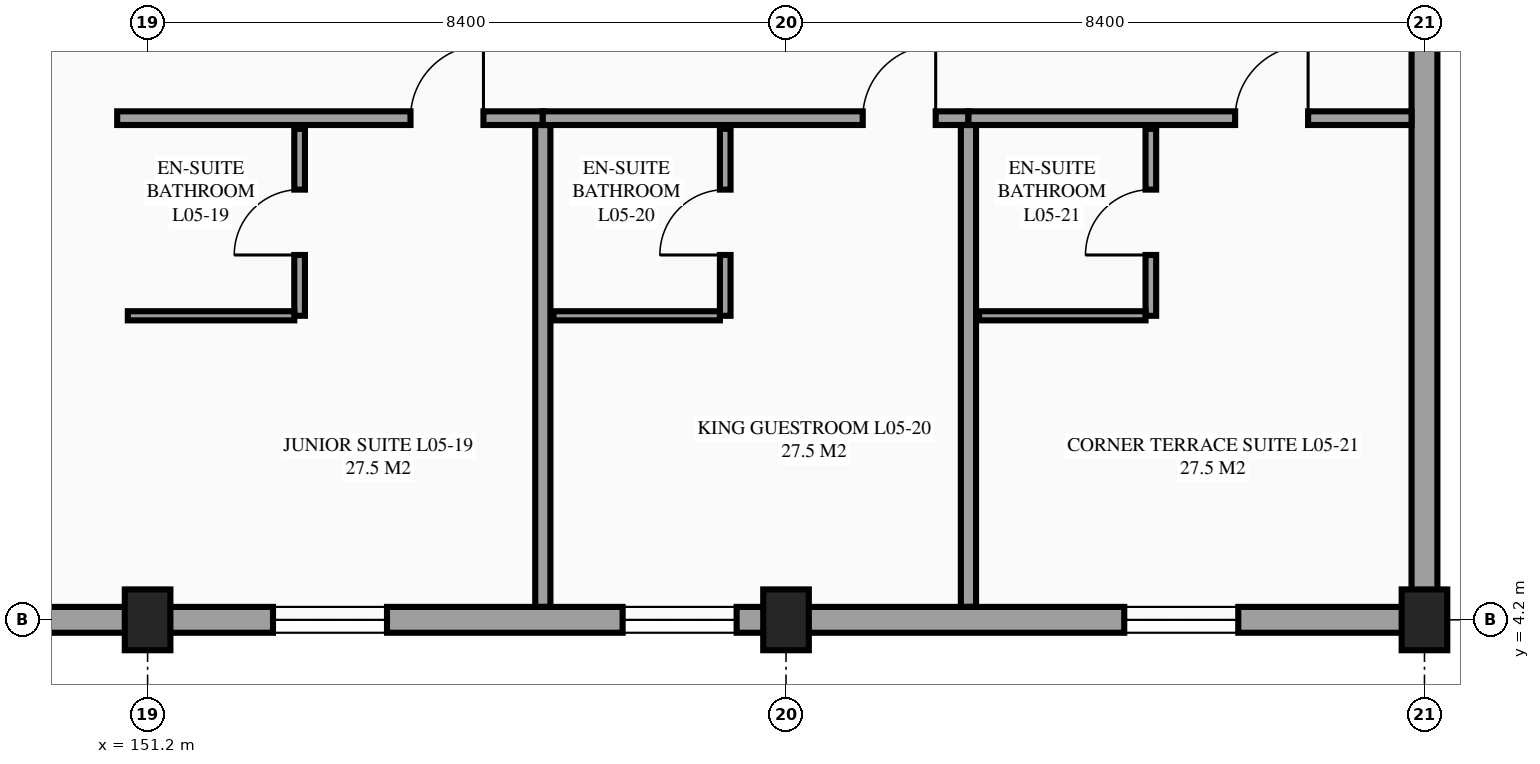
"""IFC4 building model, lengths in metres.
Left out: names, types, materials, properties, quantities, classifications, styles, units other than length and angle.
Written with IfcOpenShell. Run it as: python <this file> out.ifc"""

import sys

from ifc_helpers import new_model, si_unit, direction, frame, frame_2d, origin, origin_2d, place, context, subcontext, project, spatial, rectangle, extrude, element, fill, save


model = new_model("IFC4")
c1 = context("Model", 3, precision=1e-05, world=origin(), true_north=direction((0.0, 1.0)))
c2 = subcontext(c1, "Body", "Model", "MODEL_VIEW")
j1 = project(units=[si_unit("LENGTHUNIT", "METRE"), si_unit("PLANEANGLEUNIT", "RADIAN")], contexts=[c1])
p1 = place(None, origin())
s1 = spatial("IfcSite", under=j1, at=p1, CompositionType="ELEMENT")
p2 = place(p1, origin())
s2 = spatial("IfcBuilding", under=s1, at=p2, CompositionType="ELEMENT")
p3 = place(p2, frame((0.0, 0.0, 21.9)))
s3 = spatial("IfcBuildingStorey", under=s2, at=p3, CompositionType="ELEMENT", Elevation=21.9)
for number, where, z_axis, x_axis in (
    (1, (151.2, 4.2, 0.0), (0.0, 0.0, 1.0), (1.0, 0.0, 0.0)),
    (2, (159.6, 4.2, 0.0), (0.0, 0.0, 1.0), (1.0, 0.0, 0.0)),
    (3, (168.0, 4.2, 0.0), (0.0, 0.0, 1.0), (1.0, 0.0, 0.0)),
):
    element("IfcColumn", number, at=place(p3, frame(where, z_axis=z_axis, x_axis=x_axis)), inside=s3, PredefinedType="COLUMN", context=c2, shape_type="SweptSolid", body=[
        extrude(rectangle(XDim=0.6, YDim=0.8, at=origin_2d()), origin(), (0.0, 0.0, 1.0), 3.6),
    ])
p4 = place(p3, frame((168.0, 4.2, 0.0), z_axis=(0.0, 0.0, 1.0), x_axis=(0.0, 1.0, 0.0)))
e4 = element("IfcWall", 4, at=p4, inside=s3, PredefinedType="STANDARD", context=c2, shape_type="SweptSolid", body=[
    extrude(rectangle(XDim=16.8, YDim=0.34, at=frame_2d((8.4, 0.0))), origin(), (0.0, 0.0, 1.0), 2.48),
])
p5 = place(p3, frame((150.8, 10.8, 0.0), z_axis=(0.0, 0.0, 1.0), x_axis=(1.0, 0.0, 0.0)))
e5 = element("IfcWall", 5, at=p5, inside=s3, PredefinedType="PARTITIONING", context=c2, shape_type="SweptSolid", body=[
    extrude(rectangle(XDim=5.6, YDim=0.18, at=frame_2d((2.8, 0.0))), origin(), (0.0, 0.0, 1.0), 3.375),
])
p6 = place(p5, frame((3.859, 0.0, 0.0)))
e6 = element("IfcOpeningElement", 6, at=p6, cuts=e5, PredefinedType="OPENING", context=c2, shape_type="SweptSolid", body=[
    extrude(rectangle(XDim=0.96, YDim=2.15, at=frame_2d((0.48, 1.075))), frame((0.0, 0.1, 0.0), z_axis=(0.0, -1.0, 0.0), x_axis=(1.0, 0.0, 0.0)), (0.0, 0.0, 1.0), 0.2),
])
p7 = place(p3, frame((156.4, 4.37, 0.0), z_axis=(0.0, 0.0, 1.0), x_axis=(0.0, 1.0, 0.0)))
e7 = element("IfcWall", 7, at=p7, inside=s3, PredefinedType="PARTITIONING", context=c2, shape_type="SweptSolid", body=[
    extrude(rectangle(XDim=6.34, YDim=0.2, at=frame_2d((3.17, 0.0))), origin(), (0.0, 0.0, 1.0), 3.375),
])
p8 = place(p3, frame((153.2, 8.2, 0.0), z_axis=(0.0, 0.0, 1.0), x_axis=(0.0, 1.0, 0.0)))
e8 = element("IfcWall", 8, at=p8, inside=s3, PredefinedType="PARTITIONING", context=c2, shape_type="SweptSolid", body=[
    extrude(rectangle(XDim=2.46, YDim=0.14, at=frame_2d((1.23, 0.0))), origin(), (0.0, 0.0, 1.0), 3.375),
])
p9 = place(p8, frame((0.8, 0.0, 0.0)))
e9 = element("IfcOpeningElement", 9, at=p9, cuts=e8, PredefinedType="OPENING", context=c2, shape_type="SweptSolid", body=[
    extrude(rectangle(XDim=0.86, YDim=2.1, at=frame_2d((0.43, 1.05))), frame((0.0, 0.08, 0.0), z_axis=(0.0, -1.0, 0.0), x_axis=(1.0, 0.0, 0.0)), (0.0, 0.0, 1.0), 0.16),
])
p10 = place(p3, frame((150.94, 8.2, 0.0), z_axis=(0.0, 0.0, 1.0), x_axis=(1.0, 0.0, 0.0)))
e10 = element("IfcWall", 10, at=p10, inside=s3, PredefinedType="PARTITIONING", context=c2, shape_type="SweptSolid", body=[
    extrude(rectangle(XDim=2.19, YDim=0.12, at=frame_2d((1.095, 0.0))), origin(), (0.0, 0.0, 1.0), 3.375),
])
p11 = place(p3, frame((156.4, 10.8, 0.0), z_axis=(0.0, 0.0, 1.0), x_axis=(1.0, 0.0, 0.0)))
e11 = element("IfcWall", 11, at=p11, inside=s3, PredefinedType="PARTITIONING", context=c2, shape_type="SweptSolid", body=[
    extrude(rectangle(XDim=5.6, YDim=0.18, at=frame_2d((2.8, 0.0))), origin(), (0.0, 0.0, 1.0), 3.375),
])
p12 = place(p11, frame((4.209, 0.0, 0.0)))
e12 = element("IfcOpeningElement", 12, at=p12, cuts=e11, PredefinedType="OPENING", context=c2, shape_type="SweptSolid", body=[
    extrude(rectangle(XDim=0.96, YDim=2.15, at=frame_2d((0.48, 1.075))), frame((0.0, 0.1, 0.0), z_axis=(0.0, -1.0, 0.0), x_axis=(1.0, 0.0, 0.0)), (0.0, 0.0, 1.0), 0.2),
])
p13 = place(p3, frame((162.0, 4.37, 0.0), z_axis=(0.0, 0.0, 1.0), x_axis=(0.0, 1.0, 0.0)))
e13 = element("IfcWall", 13, at=p13, inside=s3, PredefinedType="PARTITIONING", context=c2, shape_type="SweptSolid", body=[
    extrude(rectangle(XDim=6.34, YDim=0.2, at=frame_2d((3.17, 0.0))), origin(), (0.0, 0.0, 1.0), 3.375),
])
p14 = place(p3, frame((158.8, 8.2, 0.0), z_axis=(0.0, 0.0, 1.0), x_axis=(0.0, 1.0, 0.0)))
e14 = element("IfcWall", 14, at=p14, inside=s3, PredefinedType="PARTITIONING", context=c2, shape_type="SweptSolid", body=[
    extrude(rectangle(XDim=2.46, YDim=0.14, at=frame_2d((1.23, 0.0))), origin(), (0.0, 0.0, 1.0), 3.375),
])
p15 = place(p14, frame((0.8, 0.0, 0.0)))
e15 = element("IfcOpeningElement", 15, at=p15, cuts=e14, PredefinedType="OPENING", context=c2, shape_type="SweptSolid", body=[
    extrude(rectangle(XDim=0.86, YDim=2.1, at=frame_2d((0.43, 1.05))), frame((0.0, 0.08, 0.0), z_axis=(0.0, -1.0, 0.0), x_axis=(1.0, 0.0, 0.0)), (0.0, 0.0, 1.0), 0.16),
])
p16 = place(p3, frame((156.54, 8.2, 0.0), z_axis=(0.0, 0.0, 1.0), x_axis=(1.0, 0.0, 0.0)))
e16 = element("IfcWall", 16, at=p16, inside=s3, PredefinedType="PARTITIONING", context=c2, shape_type="SweptSolid", body=[
    extrude(rectangle(XDim=2.19, YDim=0.12, at=frame_2d((1.095, 0.0))), origin(), (0.0, 0.0, 1.0), 3.375),
])
p17 = place(p3, frame((162.0, 10.8, 0.0), z_axis=(0.0, 0.0, 1.0), x_axis=(1.0, 0.0, 0.0)))
e17 = element("IfcWall", 17, at=p17, inside=s3, PredefinedType="PARTITIONING", context=c2, shape_type="SweptSolid", body=[
    extrude(rectangle(XDim=5.83, YDim=0.18, at=frame_2d((2.915, 0.0))), origin(), (0.0, 0.0, 1.0), 3.375),
])
p18 = place(p17, frame((3.509, 0.0, 0.0)))
e18 = element("IfcOpeningElement", 18, at=p18, cuts=e17, PredefinedType="OPENING", context=c2, shape_type="SweptSolid", body=[
    extrude(rectangle(XDim=0.96, YDim=2.15, at=frame_2d((0.48, 1.075))), frame((0.0, 0.1, 0.0), z_axis=(0.0, -1.0, 0.0), x_axis=(1.0, 0.0, 0.0)), (0.0, 0.0, 1.0), 0.2),
])
p19 = place(p3, frame((164.4, 8.2, 0.0), z_axis=(0.0, 0.0, 1.0), x_axis=(0.0, 1.0, 0.0)))
e19 = element("IfcWall", 19, at=p19, inside=s3, PredefinedType="PARTITIONING", context=c2, shape_type="SweptSolid", body=[
    extrude(rectangle(XDim=2.46, YDim=0.14, at=frame_2d((1.23, 0.0))), origin(), (0.0, 0.0, 1.0), 3.375),
])
p20 = place(p19, frame((0.8, 0.0, 0.0)))
e20 = element("IfcOpeningElement", 20, at=p20, cuts=e19, PredefinedType="OPENING", context=c2, shape_type="SweptSolid", body=[
    extrude(rectangle(XDim=0.86, YDim=2.1, at=frame_2d((0.43, 1.05))), frame((0.0, 0.08, 0.0), z_axis=(0.0, -1.0, 0.0), x_axis=(1.0, 0.0, 0.0)), (0.0, 0.0, 1.0), 0.16),
])
p21 = place(p3, frame((162.14, 8.2, 0.0), z_axis=(0.0, 0.0, 1.0), x_axis=(1.0, 0.0, 0.0)))
e21 = element("IfcWall", 21, at=p21, inside=s3, PredefinedType="PARTITIONING", context=c2, shape_type="SweptSolid", body=[
    extrude(rectangle(XDim=2.19, YDim=0.12, at=frame_2d((1.095, 0.0))), origin(), (0.0, 0.0, 1.0), 3.375),
])
p22 = place(p3, frame((142.8, 4.2, 0.0), z_axis=(0.0, 0.0, 1.0), x_axis=(1.0, 0.0, 0.0)))
e22 = element("IfcWall", 22, at=p22, inside=s3, PredefinedType="STANDARD", context=c2, shape_type="SweptSolid", body=[
    extrude(rectangle(XDim=16.8, YDim=0.34, at=frame_2d((8.4, 0.0))), origin(), (0.0, 0.0, 1.0), 2.48),
])
p23 = place(p22, frame((10.05, 0.0, 0.85)))
e23 = element("IfcOpeningElement", 23, at=p23, cuts=e22, PredefinedType="OPENING", context=c2, shape_type="SweptSolid", body=[
    extrude(rectangle(XDim=1.5, YDim=1.5, at=frame_2d((0.75, 0.75))), frame((0.0, 0.18, 0.0), z_axis=(0.0, -1.0, 0.0), x_axis=(1.0, 0.0, 0.0)), (0.0, 0.0, 1.0), 0.36),
])
p24 = place(p22, frame((14.65, 0.0, 0.85)))
e24 = element("IfcOpeningElement", 24, at=p24, cuts=e22, PredefinedType="OPENING", context=c2, shape_type="SweptSolid", body=[
    extrude(rectangle(XDim=1.5, YDim=1.5, at=frame_2d((0.75, 0.75))), frame((0.0, 0.18, 0.0), z_axis=(0.0, -1.0, 0.0), x_axis=(1.0, 0.0, 0.0)), (0.0, 0.0, 1.0), 0.36),
])
p25 = place(p3, frame((159.6, 4.2, 0.0), z_axis=(0.0, 0.0, 1.0), x_axis=(1.0, 0.0, 0.0)))
e25 = element("IfcWall", 25, at=p25, inside=s3, PredefinedType="STANDARD", context=c2, shape_type="SweptSolid", body=[
    extrude(rectangle(XDim=8.4, YDim=0.34, at=frame_2d((4.2, 0.0))), origin(), (0.0, 0.0, 1.0), 3.075),
])
p26 = place(p25, frame((4.45, 0.0, 0.85)))
e26 = element("IfcOpeningElement", 26, at=p26, cuts=e25, PredefinedType="OPENING", context=c2, shape_type="SweptSolid", body=[
    extrude(rectangle(XDim=1.5, YDim=1.5, at=frame_2d((0.75, 0.75))), frame((0.0, 0.18, 0.0), z_axis=(0.0, -1.0, 0.0), x_axis=(1.0, 0.0, 0.0)), (0.0, 0.0, 1.0), 0.36),
])
p27 = place(p23, origin())
e27 = element("IfcWindow", 27, at=p27, inside=s3, PartitioningType="SINGLE_PANEL", PredefinedType="WINDOW", context=c2, shape_type="SweptSolid", body=[
    extrude(rectangle(XDim=1.5, YDim=1.5, at=frame_2d((0.75, 0.75))), frame((0.0, 0.03, 0.0), z_axis=(0.0, -1.0, 0.0), x_axis=(1.0, 0.0, 0.0)), (0.0, 0.0, 1.0), 0.06),
])
fill(e23, e27)
p28 = place(p24, origin())
e28 = element("IfcWindow", 28, at=p28, inside=s3, PartitioningType="SINGLE_PANEL", PredefinedType="WINDOW", context=c2, shape_type="SweptSolid", body=[
    extrude(rectangle(XDim=1.5, YDim=1.5, at=frame_2d((0.75, 0.75))), frame((0.0, 0.03, 0.0), z_axis=(0.0, -1.0, 0.0), x_axis=(1.0, 0.0, 0.0)), (0.0, 0.0, 1.0), 0.06),
])
fill(e24, e28)
p29 = place(p26, origin())
e29 = element("IfcWindow", 29, at=p29, inside=s3, PartitioningType="SINGLE_PANEL", PredefinedType="WINDOW", context=c2, shape_type="SweptSolid", body=[
    extrude(rectangle(XDim=1.5, YDim=1.5, at=frame_2d((0.75, 0.75))), frame((0.0, 0.03, 0.0), z_axis=(0.0, -1.0, 0.0), x_axis=(1.0, 0.0, 0.0)), (0.0, 0.0, 1.0), 0.06),
])
fill(e26, e29)
p30 = place(p6, origin())
e30 = element("IfcDoor", 30, at=p30, inside=s3, OperationType="SINGLE_SWING_RIGHT", PredefinedType="DOOR", context=c2, shape_type="SweptSolid", body=[
    extrude(rectangle(XDim=0.96, YDim=2.15, at=frame_2d((0.48, 1.075))), frame((0.0, 0.025, 0.0), z_axis=(0.0, -1.0, 0.0), x_axis=(1.0, 0.0, 0.0)), (0.0, 0.0, 1.0), 0.05),
])
fill(e6, e30)
p31 = place(p9, origin())
e31 = element("IfcDoor", 31, at=p31, inside=s3, OperationType="SINGLE_SWING_LEFT", PredefinedType="DOOR", context=c2, shape_type="SweptSolid", body=[
    extrude(rectangle(XDim=0.86, YDim=2.1, at=frame_2d((0.43, 1.05))), frame((0.0, 0.025, 0.0), z_axis=(0.0, -1.0, 0.0), x_axis=(1.0, 0.0, 0.0)), (0.0, 0.0, 1.0), 0.05),
])
fill(e9, e31)
p32 = place(p12, origin())
e32 = element("IfcDoor", 32, at=p32, inside=s3, OperationType="SINGLE_SWING_RIGHT", PredefinedType="DOOR", context=c2, shape_type="SweptSolid", body=[
    extrude(rectangle(XDim=0.96, YDim=2.15, at=frame_2d((0.48, 1.075))), frame((0.0, 0.025, 0.0), z_axis=(0.0, -1.0, 0.0), x_axis=(1.0, 0.0, 0.0)), (0.0, 0.0, 1.0), 0.05),
])
fill(e12, e32)
p33 = place(p15, origin())
e33 = element("IfcDoor", 33, at=p33, inside=s3, OperationType="SINGLE_SWING_LEFT", PredefinedType="DOOR", context=c2, shape_type="SweptSolid", body=[
    extrude(rectangle(XDim=0.86, YDim=2.1, at=frame_2d((0.43, 1.05))), frame((0.0, 0.025, 0.0), z_axis=(0.0, -1.0, 0.0), x_axis=(1.0, 0.0, 0.0)), (0.0, 0.0, 1.0), 0.05),
])
fill(e15, e33)
p34 = place(p18, origin())
e34 = element("IfcDoor", 34, at=p34, inside=s3, OperationType="SINGLE_SWING_RIGHT", PredefinedType="DOOR", context=c2, shape_type="SweptSolid", body=[
    extrude(rectangle(XDim=0.96, YDim=2.15, at=frame_2d((0.48, 1.075))), frame((0.0, 0.025, 0.0), z_axis=(0.0, -1.0, 0.0), x_axis=(1.0, 0.0, 0.0)), (0.0, 0.0, 1.0), 0.05),
])
fill(e18, e34)
p35 = place(p20, origin())
e35 = element("IfcDoor", 35, at=p35, inside=s3, OperationType="SINGLE_SWING_LEFT", PredefinedType="DOOR", context=c2, shape_type="SweptSolid", body=[
    extrude(rectangle(XDim=0.86, YDim=2.1, at=frame_2d((0.43, 1.05))), frame((0.0, 0.025, 0.0), z_axis=(0.0, -1.0, 0.0), x_axis=(1.0, 0.0, 0.0)), (0.0, 0.0, 1.0), 0.05),
])
fill(e20, e35)
save(model, sys.argv[1])
